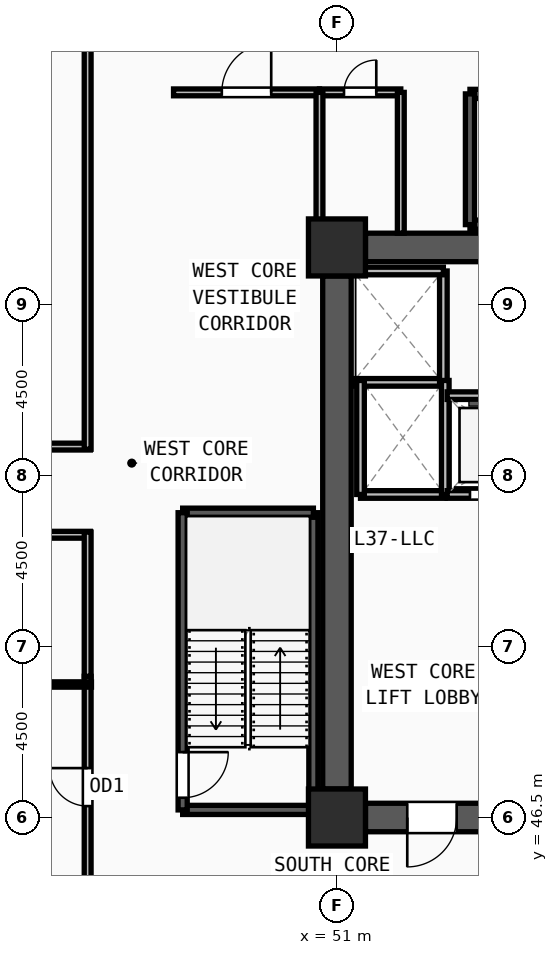
"""IFC4 building model, lengths in metres.
Left out: names, types, materials, properties, quantities, classifications, styles, units other than length and angle.
Written with IfcOpenShell. Run it as: python <this file> out.ifc"""

import sys

from ifc_helpers import new_model, si_unit, direction, frame, frame_2d, origin, origin_2d, place, context, subcontext, project, spatial, rectangle, extrude, source, transform, mapped, element, fill, save


model = new_model("IFC4")
c1 = context("Model", 3, precision=1e-05, world=origin(), true_north=direction((0.0, 1.0)))
c2 = subcontext(c1, "Body", "Model", "MODEL_VIEW")
j1 = project(units=[si_unit("LENGTHUNIT", "METRE"), si_unit("PLANEANGLEUNIT", "RADIAN")], contexts=[c1])
p1 = place(None, origin())
s1 = spatial("IfcSite", under=j1, at=p1, CompositionType="ELEMENT")
p2 = place(p1, origin())
s2 = spatial("IfcBuilding", under=s1, at=p2, CompositionType="ELEMENT")
p3 = place(p2, frame((0.0, 0.0, 144.0)))
s3 = spatial("IfcBuildingStorey", under=s2, at=p3, CompositionType="ELEMENT", Elevation=144.0)
m1 = source(origin(), c2, "Body", "SweptSolid", [
    extrude(rectangle(XDim=1.5, YDim=1.5, at=origin_2d()), origin(), (0.0, 0.0, 1.0), 3.75),
])
for number, where, z_axis, x_axis in (
    (1, (51.0, 46.5, 0.0), (0.0, 0.0, 1.0), (1.0, 0.0, 0.0)),
    (2, (51.0, 61.5, 0.0), (0.0, 0.0, 1.0), (1.0, 0.0, 0.0)),
):
    element("IfcColumn", number, at=place(p3, frame(where, z_axis=z_axis, x_axis=x_axis)), inside=s3, PredefinedType="COLUMN", context=c2, shape_type="MappedRepresentation", body=[
        mapped(m1, transform((0.0, 0.0, 0.0), x_axis=(1.0, 0.0, 0.0), y_axis=(0.0, 1.0, 0.0), z_axis=(0.0, 0.0, 1.0), scale=1.0)),
    ])
p4 = place(p3, frame((51.75, 61.5, 0.0), z_axis=(0.0, 0.0, 1.0), x_axis=(1.0, 0.0, 0.0)))
e3 = element("IfcWall", 3, at=p4, inside=s3, PredefinedType="SHEAR", context=c2, shape_type="SweptSolid", body=[
    extrude(rectangle(XDim=7.5, YDim=0.75, at=frame_2d((3.75, 0.0))), origin(), (0.0, 0.0, 1.0), 3.57),
])
p5 = place(p3, frame((59.25, 46.5, 0.0), z_axis=(0.0, 0.0, 1.0), x_axis=(-1.0, 0.0, 0.0)))
e4 = element("IfcWall", 4, at=p5, inside=s3, PredefinedType="SHEAR", context=c2, shape_type="SweptSolid", body=[
    extrude(rectangle(XDim=7.5, YDim=0.75, at=frame_2d((3.75, 0.0))), origin(), (0.0, 0.0, 1.0), 3.57),
])
m2 = source(origin(), c2, "Body", "SweptSolid", [
    extrude(rectangle(XDim=1.3, YDim=2.2, at=frame_2d((0.65, 1.1))), frame((0.0, 0.385, 0.0), z_axis=(0.0, -1.0, 0.0), x_axis=(1.0, 0.0, 0.0)), (0.0, 0.0, 1.0), 0.77),
])
p6 = place(p5, frame((5.1, 0.0, 0.0)))
e5 = element("IfcOpeningElement", 5, at=p6, cuts=e4, PredefinedType="OPENING", context=c2, shape_type="MappedRepresentation", body=[
    mapped(m2, transform((0.0, 0.0, 0.0), x_axis=(1.0, 0.0, 0.0), y_axis=(0.0, 1.0, 0.0), z_axis=(0.0, 0.0, 1.0), scale=1.0)),
])
m3 = source(origin(), c2, "Body", "SweptSolid", [
    extrude(rectangle(XDim=1.0, YDim=2.2, at=frame_2d((0.5, 1.1))), frame((0.0, 0.385, 0.0), z_axis=(0.0, -1.0, 0.0), x_axis=(1.0, 0.0, 0.0)), (0.0, 0.0, 1.0), 0.77),
])
p7 = place(p5, frame((0.6, 0.0, 0.0)))
e6 = element("IfcOpeningElement", 6, at=p7, cuts=e4, PredefinedType="OPENING", context=c2, shape_type="MappedRepresentation", body=[
    mapped(m3, transform((0.0, 0.0, 0.0), x_axis=(1.0, 0.0, 0.0), y_axis=(0.0, 1.0, 0.0), z_axis=(0.0, 0.0, 1.0), scale=1.0)),
])
p8 = place(p3, frame((51.0, 47.25, 0.0), z_axis=(0.0, 0.0, 1.0), x_axis=(0.0, 1.0, 0.0)))
e7 = element("IfcWall", 7, at=p8, inside=s3, PredefinedType="SHEAR", context=c2, shape_type="SweptSolid", body=[
    extrude(rectangle(XDim=13.5, YDim=0.75, at=frame_2d((6.75, 0.0))), origin(), (0.0, 0.0, 1.0), 3.57),
])
p9 = place(p3, frame((46.94, 46.7, 0.0), z_axis=(0.0, 0.0, 1.0), x_axis=(1.0, 0.0, 0.0)))
e8 = element("IfcWall", 8, at=p9, inside=s3, PredefinedType="SOLIDWALL", context=c2, shape_type="SweptSolid", body=[
    extrude(rectangle(XDim=3.44, YDim=0.24, at=frame_2d((1.72, 0.0))), origin(), (0.0, 0.0, 1.0), 3.57),
])
p10 = place(p3, frame((50.38, 46.7, 0.0), z_axis=(0.0, 0.0, 1.0), x_axis=(0.0, 1.0, 0.0)))
e9 = element("IfcWall", 9, at=p10, inside=s3, PredefinedType="SOLIDWALL", context=c2, shape_type="SweptSolid", body=[
    extrude(rectangle(XDim=7.82, YDim=0.24, at=frame_2d((3.91, 0.0))), origin(), (0.0, 0.0, 1.0), 3.57),
])
p11 = place(p3, frame((50.38, 54.52, 0.0), z_axis=(0.0, 0.0, 1.0), x_axis=(-1.0, 0.0, 0.0)))
e10 = element("IfcWall", 10, at=p11, inside=s3, PredefinedType="SOLIDWALL", context=c2, shape_type="SweptSolid", body=[
    extrude(rectangle(XDim=3.44, YDim=0.24, at=frame_2d((1.72, 0.0))), origin(), (0.0, 0.0, 1.0), 3.57),
])
p12 = place(p3, frame((46.94, 54.52, 0.0), z_axis=(0.0, 0.0, 1.0), x_axis=(0.0, -1.0, 0.0)))
e11 = element("IfcWall", 11, at=p12, inside=s3, PredefinedType="SOLIDWALL", context=c2, shape_type="SweptSolid", body=[
    extrude(rectangle(XDim=7.82, YDim=0.24, at=frame_2d((3.91, 0.0))), origin(), (0.0, 0.0, 1.0), 3.57),
])
m4 = source(origin(), c2, "Body", "SweptSolid", [
    extrude(rectangle(XDim=1.2, YDim=2.2, at=frame_2d((0.6, 1.1))), frame((0.0, 0.13, 0.0), z_axis=(0.0, -1.0, 0.0), x_axis=(1.0, 0.0, 0.0)), (0.0, 0.0, 1.0), 0.26),
])
p13 = place(p12, frame((6.3, 0.0, 0.0)))
e12 = element("IfcOpeningElement", 12, at=p13, cuts=e11, PredefinedType="OPENING", context=c2, shape_type="MappedRepresentation", body=[
    mapped(m4, transform((0.0, 0.0, 0.0), x_axis=(1.0, 0.0, 0.0), y_axis=(0.0, 1.0, 0.0), z_axis=(0.0, 0.0, 1.0), scale=1.0)),
])
p14 = place(p3, frame((54.5, 62.1, 0.0), z_axis=(0.0, 0.0, 1.0), x_axis=(1.0, 0.0, 0.0)))
e13 = element("IfcWall", 13, at=p14, inside=s3, PredefinedType="SOLIDWALL", context=c2, shape_type="SweptSolid", body=[
    extrude(rectangle(XDim=7.82, YDim=0.24, at=frame_2d((3.91, 0.0))), origin(), (0.0, 0.0, 1.0), 3.57),
])
p15 = place(p3, frame((62.32, 65.54, 0.0), z_axis=(0.0, 0.0, 1.0), x_axis=(-1.0, 0.0, 0.0)))
e14 = element("IfcWall", 14, at=p15, inside=s3, PredefinedType="SOLIDWALL", context=c2, shape_type="SweptSolid", body=[
    extrude(rectangle(XDim=7.82, YDim=0.24, at=frame_2d((3.91, 0.0))), origin(), (0.0, 0.0, 1.0), 3.57),
])
p16 = place(p15, frame((6.3, 0.0, 0.0)))
e15 = element("IfcOpeningElement", 15, at=p16, cuts=e14, PredefinedType="OPENING", context=c2, shape_type="MappedRepresentation", body=[
    mapped(m4, transform((0.0, 0.0, 0.0), x_axis=(1.0, 0.0, 0.0), y_axis=(0.0, 1.0, 0.0), z_axis=(0.0, 0.0, 1.0), scale=1.0)),
])
p17 = place(p3, frame((54.5, 65.54, 0.0), z_axis=(0.0, 0.0, 1.0), x_axis=(0.0, -1.0, 0.0)))
e16 = element("IfcWall", 16, at=p17, inside=s3, PredefinedType="SOLIDWALL", context=c2, shape_type="SweptSolid", body=[
    extrude(rectangle(XDim=3.44, YDim=0.24, at=frame_2d((1.72, 0.0))), origin(), (0.0, 0.0, 1.0), 3.57),
])
p18 = place(p3, frame((51.4, 57.95, 0.0), z_axis=(0.0, 0.0, 1.0), x_axis=(1.0, 0.0, 0.0)))
e17 = element("IfcWall", 17, at=p18, inside=s3, PredefinedType="SOLIDWALL", context=c2, shape_type="SweptSolid", body=[
    extrude(rectangle(XDim=2.4, YDim=0.2, at=frame_2d((1.2, 0.0))), origin(), (0.0, 0.0, 1.0), 3.57),
])
p19 = place(p3, frame((53.8, 57.95, 0.0), z_axis=(0.0, 0.0, 1.0), x_axis=(0.0, 1.0, 0.0)))
e18 = element("IfcWall", 18, at=p19, inside=s3, PredefinedType="SOLIDWALL", context=c2, shape_type="SweptSolid", body=[
    extrude(rectangle(XDim=2.93, YDim=0.2, at=frame_2d((1.465, 0.0))), origin(), (0.0, 0.0, 1.0), 3.57),
])
p20 = place(p3, frame((53.8, 60.88, 0.0), z_axis=(0.0, 0.0, 1.0), x_axis=(-1.0, 0.0, 0.0)))
e19 = element("IfcWall", 19, at=p20, inside=s3, PredefinedType="SOLIDWALL", context=c2, shape_type="SweptSolid", body=[
    extrude(rectangle(XDim=2.4, YDim=0.2, at=frame_2d((1.2, 0.0))), origin(), (0.0, 0.0, 1.0), 3.57),
])
p21 = place(p3, frame((51.62, 55.0, 0.0), z_axis=(0.0, 0.0, 1.0), x_axis=(1.0, 0.0, 0.0)))
e20 = element("IfcWall", 20, at=p21, inside=s3, PredefinedType="SOLIDWALL", context=c2, shape_type="SweptSolid", body=[
    extrude(rectangle(XDim=2.23, YDim=0.2, at=frame_2d((1.115, 0.0))), origin(), (0.0, 0.0, 1.0), 3.57),
])
for number, where, z_axis, x_axis in (
    (21, (53.85, 55.0, 0.0), (0.0, 0.0, 1.0), (0.0, 1.0, 0.0)),
    (22, (51.62, 58.0, 0.0), (0.0, 0.0, 1.0), (0.0, -1.0, 0.0)),
):
    element("IfcWall", number, at=place(p3, frame(where, z_axis=z_axis, x_axis=x_axis)), inside=s3, PredefinedType="SOLIDWALL", context=c2, shape_type="SweptSolid", body=[
        extrude(rectangle(XDim=3.0, YDim=0.2, at=frame_2d((1.5, 0.0))), origin(), (0.0, 0.0, 1.0), 3.57),
    ])
p22 = place(p3, frame((53.9, 55.0, 0.0), z_axis=(0.0, 0.0, 1.0), x_axis=(1.0, 0.0, 0.0)))
e23 = element("IfcWall", 23, at=p22, inside=s3, PredefinedType="SOLIDWALL", context=c2, shape_type="SweptSolid", body=[
    extrude(rectangle(XDim=2.3, YDim=0.2, at=frame_2d((1.15, 0.0))), origin(), (0.0, 0.0, 1.0), 3.57),
])
m5 = source(origin(), c2, "Body", "SweptSolid", [
    extrude(rectangle(XDim=1.1, YDim=2.2, at=frame_2d((0.55, 1.1))), frame((0.0, 0.11, 0.0), z_axis=(0.0, -1.0, 0.0), x_axis=(1.0, 0.0, 0.0)), (0.0, 0.0, 1.0), 0.22),
])
p23 = place(p22, frame((0.6, 0.0, 0.0)))
e24 = element("IfcOpeningElement", 24, at=p23, cuts=e23, PredefinedType="OPENING", context=c2, shape_type="MappedRepresentation", body=[
    mapped(m5, transform((0.0, 0.0, 0.0), x_axis=(1.0, 0.0, 0.0), y_axis=(0.0, 1.0, 0.0), z_axis=(0.0, 0.0, 1.0), scale=1.0)),
])
p24 = place(p3, frame((56.2, 57.6, 0.0), z_axis=(0.0, 0.0, 1.0), x_axis=(-1.0, 0.0, 0.0)))
e25 = element("IfcWall", 25, at=p24, inside=s3, PredefinedType="SOLIDWALL", context=c2, shape_type="SweptSolid", body=[
    extrude(rectangle(XDim=2.3, YDim=0.2, at=frame_2d((1.15, 0.0))), origin(), (0.0, 0.0, 1.0), 3.57),
])
p25 = place(p3, frame((50.54, 65.58, 0.0), z_axis=(0.0, 0.0, 1.0), x_axis=(1.0, 0.0, 0.0)))
e26 = element("IfcWall", 26, at=p25, inside=s3, PredefinedType="PARTITIONING", context=c2, shape_type="SweptSolid", body=[
    extrude(rectangle(XDim=2.14, YDim=0.18, at=frame_2d((1.07, 0.0))), origin(), (0.0, 0.0, 1.0), 3.57),
])
m6 = source(origin(), c2, "Body", "SweptSolid", [
    extrude(rectangle(XDim=0.85, YDim=2.1, at=frame_2d((0.425, 1.05))), frame((0.0, 0.1, 0.0), z_axis=(0.0, -1.0, 0.0), x_axis=(1.0, 0.0, 0.0)), (0.0, 0.0, 1.0), 0.2),
])
p26 = place(p25, frame((0.645, 0.0, 0.0)))
e27 = element("IfcOpeningElement", 27, at=p26, cuts=e26, PredefinedType="OPENING", context=c2, shape_type="MappedRepresentation", body=[
    mapped(m6, transform((0.0, 0.0, 0.0), x_axis=(1.0, 0.0, 0.0), y_axis=(0.0, 1.0, 0.0), z_axis=(0.0, 0.0, 1.0), scale=1.0)),
])
p27 = place(p3, frame((46.7, 65.58, 0.0), z_axis=(0.0, 0.0, 1.0), x_axis=(1.0, 0.0, 0.0)))
e28 = element("IfcWall", 28, at=p27, inside=s3, PredefinedType="PARTITIONING", context=c2, shape_type="SweptSolid", body=[
    extrude(rectangle(XDim=3.84, YDim=0.18, at=frame_2d((1.92, 0.0))), origin(), (0.0, 0.0, 1.0), 3.57),
])
m7 = source(origin(), c2, "Body", "SweptSolid", [
    extrude(rectangle(XDim=1.3, YDim=2.2, at=frame_2d((0.65, 1.1))), frame((0.0, 0.1, 0.0), z_axis=(0.0, -1.0, 0.0), x_axis=(1.0, 0.0, 0.0)), (0.0, 0.0, 1.0), 0.2),
])
p28 = place(p27, frame((1.27, 0.0, 0.0)))
e29 = element("IfcOpeningElement", 29, at=p28, cuts=e28, PredefinedType="OPENING", context=c2, shape_type="MappedRepresentation", body=[
    mapped(m7, transform((0.0, 0.0, 0.0), x_axis=(1.0, 0.0, 0.0), y_axis=(0.0, 1.0, 0.0), z_axis=(0.0, 0.0, 1.0), scale=1.0)),
])
p29 = place(p3, frame((29.701, 56.26, 0.0), z_axis=(0.0, 0.0, 1.0), x_axis=(1.0, 0.0, 0.0)))
e30 = element("IfcWall", 30, at=p29, inside=s3, PredefinedType="PARTITIONING", context=c2, shape_type="SweptSolid", body=[
    extrude(rectangle(XDim=14.809, YDim=0.18, at=frame_2d((7.405, 0.0))), origin(), (0.0, 0.0, 1.0), 3.57),
])
m8 = source(origin(), c2, "Body", "SweptSolid", [
    extrude(rectangle(XDim=1.5, YDim=2.2, at=frame_2d((0.75, 1.1))), frame((0.0, 0.1, 0.0), z_axis=(0.0, -1.0, 0.0), x_axis=(1.0, 0.0, 0.0)), (0.0, 0.0, 1.0), 0.2),
])
p30 = place(p29, frame((6.654, 0.0, 0.0)))
e31 = element("IfcOpeningElement", 31, at=p30, cuts=e30, PredefinedType="OPENING", context=c2, shape_type="MappedRepresentation", body=[
    mapped(m8, transform((0.0, 0.0, 0.0), x_axis=(1.0, 0.0, 0.0), y_axis=(0.0, 1.0, 0.0), z_axis=(0.0, 0.0, 1.0), scale=1.0)),
])
p31 = place(p3, frame((44.51, 53.94, 0.0), z_axis=(0.0, 0.0, 1.0), x_axis=(-1.0, 0.0, 0.0)))
e32 = element("IfcWall", 32, at=p31, inside=s3, PredefinedType="PARTITIONING", context=c2, shape_type="SweptSolid", body=[
    extrude(rectangle(XDim=13.647, YDim=0.18, at=frame_2d((6.823, 0.0))), origin(), (0.0, 0.0, 1.0), 3.57),
])
m9 = source(origin(), c2, "Body", "SweptSolid", [
    extrude(rectangle(XDim=1.0, YDim=2.2, at=frame_2d((0.5, 1.1))), frame((0.0, 0.1, 0.0), z_axis=(0.0, -1.0, 0.0), x_axis=(1.0, 0.0, 0.0)), (0.0, 0.0, 1.0), 0.2),
])
p32 = place(p31, frame((6.323, 0.0, 0.0)))
e33 = element("IfcOpeningElement", 33, at=p32, cuts=e32, PredefinedType="OPENING", context=c2, shape_type="MappedRepresentation", body=[
    mapped(m9, transform((0.0, 0.0, 0.0), x_axis=(1.0, 0.0, 0.0), y_axis=(0.0, 1.0, 0.0), z_axis=(0.0, 0.0, 1.0), scale=1.0)),
])
p33 = place(p3, frame((44.44, 44.385, 0.0), z_axis=(0.0, 0.0, 1.0), x_axis=(0.0, 1.0, 0.0)))
e34 = element("IfcWall", 34, at=p33, inside=s3, PredefinedType="PARTITIONING", context=c2, shape_type="SweptSolid", body=[
    extrude(rectangle(XDim=5.83, YDim=0.18, at=frame_2d((2.915, 0.0))), origin(), (0.0, 0.0, 1.0), 3.57),
])
p34 = place(p33, frame((2.415, 0.0, 0.0)))
e35 = element("IfcOpeningElement", 35, at=p34, cuts=e34, PredefinedType="OPENING", context=c2, shape_type="MappedRepresentation", body=[
    mapped(m9, transform((0.0, 0.0, 0.0), x_axis=(1.0, 0.0, 0.0), y_axis=(0.0, 1.0, 0.0), z_axis=(0.0, 0.0, 1.0), scale=1.0)),
])
p35 = place(p3, frame((50.54, 61.95, 0.0), z_axis=(0.0, 0.0, 1.0), x_axis=(0.0, 1.0, 0.0)))
e36 = element("IfcWall", 36, at=p35, inside=s3, PredefinedType="PARTITIONING", context=c2, shape_type="SweptSolid", body=[
    extrude(rectangle(XDim=3.63, YDim=0.18, at=frame_2d((1.815, 0.0))), origin(), (0.0, 0.0, 1.0), 3.57),
])
p36 = place(p3, frame((52.68, 61.875, 0.0), z_axis=(0.0, 0.0, 1.0), x_axis=(0.0, 1.0, 0.0)))
e37 = element("IfcWall", 37, at=p36, inside=s3, PredefinedType="PARTITIONING", context=c2, shape_type="SweptSolid", body=[
    extrude(rectangle(XDim=3.705, YDim=0.18, at=frame_2d((1.853, 0.0))), origin(), (0.0, 0.0, 1.0), 3.57),
])
p37 = place(p3, frame((44.44, 56.19, 0.0), z_axis=(0.0, 0.0, 1.0), x_axis=(0.0, 1.0, 0.0)))
e38 = element("IfcWall", 38, at=p37, inside=s3, PredefinedType="PARTITIONING", context=c2, shape_type="SweptSolid", body=[
    extrude(rectangle(XDim=10.595, YDim=0.18, at=frame_2d((5.297, 0.0))), origin(), (0.0, 0.0, 1.0), 3.57),
])
p38 = place(p3, frame((44.44, 50.215, 0.0), z_axis=(0.0, 0.0, 1.0), x_axis=(0.0, 1.0, 0.0)))
e39 = element("IfcWall", 39, at=p38, inside=s3, PredefinedType="PARTITIONING", context=c2, shape_type="SweptSolid", body=[
    extrude(rectangle(XDim=3.795, YDim=0.18, at=frame_2d((1.897, 0.0))), origin(), (0.0, 0.0, 1.0), 3.57),
])
p39 = place(p3, frame((44.54, 50.0, 0.0), z_axis=(0.0, 0.0, 1.0), x_axis=(-1.0, 0.0, 0.0)))
e40 = element("IfcWall", 40, at=p39, inside=s3, PredefinedType="PARTITIONING", context=c2, shape_type="SweptSolid", body=[
    extrude(rectangle(XDim=11.813, YDim=0.14, at=frame_2d((5.906, 0.0))), origin(), (0.0, 0.0, 1.0), 3.57),
])
m10 = source(origin(), c2, "Body", "SweptSolid", [
    extrude(rectangle(XDim=1.3, YDim=2.2, at=frame_2d((0.65, 1.1))), frame((0.0, 0.025, 0.0), z_axis=(0.0, -1.0, 0.0), x_axis=(1.0, 0.0, 0.0)), (0.0, 0.0, 1.0), 0.05),
])
p40 = place(p6, origin())
e41 = element("IfcDoor", 41, at=p40, inside=s3, OperationType="SINGLE_SWING_RIGHT", PredefinedType="DOOR", context=c2, shape_type="MappedRepresentation", body=[
    mapped(m10, transform((0.0, 0.0, 0.0), x_axis=(1.0, 0.0, 0.0), y_axis=(0.0, 1.0, 0.0), z_axis=(0.0, 0.0, 1.0), scale=1.0)),
])
fill(e5, e41)
m11 = source(origin(), c2, "Body", "SweptSolid", [
    extrude(rectangle(XDim=1.2, YDim=2.2, at=frame_2d((0.6, 1.1))), frame((0.0, 0.025, 0.0), z_axis=(0.0, -1.0, 0.0), x_axis=(1.0, 0.0, 0.0)), (0.0, 0.0, 1.0), 0.05),
])
p41 = place(p13, origin())
e42 = element("IfcDoor", 42, at=p41, inside=s3, OperationType="SINGLE_SWING_LEFT", PredefinedType="DOOR", context=c2, shape_type="MappedRepresentation", body=[
    mapped(m11, transform((0.0, 0.0, 0.0), x_axis=(1.0, 0.0, 0.0), y_axis=(0.0, 1.0, 0.0), z_axis=(0.0, 0.0, 1.0), scale=1.0)),
])
fill(e12, e42)
m12 = source(origin(), c2, "Body", "SweptSolid", [
    extrude(rectangle(XDim=1.1, YDim=2.2, at=frame_2d((0.55, 1.1))), frame((0.0, 0.025, 0.0), z_axis=(0.0, -1.0, 0.0), x_axis=(1.0, 0.0, 0.0)), (0.0, 0.0, 1.0), 0.05),
])
p42 = place(p23, origin())
e43 = element("IfcDoor", 43, at=p42, inside=s3, OperationType="SLIDING_TO_LEFT", PredefinedType="DOOR", context=c2, shape_type="MappedRepresentation", body=[
    mapped(m12, transform((0.0, 0.0, 0.0), x_axis=(1.0, 0.0, 0.0), y_axis=(0.0, 1.0, 0.0), z_axis=(0.0, 0.0, 1.0), scale=1.0)),
])
fill(e24, e43)
m13 = source(origin(), c2, "Body", "SweptSolid", [
    extrude(rectangle(XDim=0.85, YDim=2.1, at=frame_2d((0.425, 1.05))), frame((0.0, 0.025, 0.0), z_axis=(0.0, -1.0, 0.0), x_axis=(1.0, 0.0, 0.0)), (0.0, 0.0, 1.0), 0.05),
])
p43 = place(p26, origin())
e44 = element("IfcDoor", 44, at=p43, inside=s3, OperationType="SINGLE_SWING_RIGHT", PredefinedType="DOOR", context=c2, shape_type="MappedRepresentation", body=[
    mapped(m13, transform((0.0, 0.0, 0.0), x_axis=(1.0, 0.0, 0.0), y_axis=(0.0, 1.0, 0.0), z_axis=(0.0, 0.0, 1.0), scale=1.0)),
])
fill(e27, e44)
p44 = place(p28, origin())
e45 = element("IfcDoor", 45, at=p44, inside=s3, OperationType="SINGLE_SWING_RIGHT", PredefinedType="DOOR", context=c2, shape_type="MappedRepresentation", body=[
    mapped(m10, transform((0.0, 0.0, 0.0), x_axis=(1.0, 0.0, 0.0), y_axis=(0.0, 1.0, 0.0), z_axis=(0.0, 0.0, 1.0), scale=1.0)),
])
fill(e29, e45)
m14 = source(origin(), c2, "Body", "SweptSolid", [
    extrude(rectangle(XDim=1.0, YDim=2.2, at=frame_2d((0.5, 1.1))), frame((0.0, 0.025, 0.0), z_axis=(0.0, -1.0, 0.0), x_axis=(1.0, 0.0, 0.0)), (0.0, 0.0, 1.0), 0.05),
])
p45 = place(p34, origin())
e46 = element("IfcDoor", 46, at=p45, inside=s3, OperationType="SINGLE_SWING_RIGHT", PredefinedType="DOOR", context=c2, shape_type="MappedRepresentation", body=[
    mapped(m14, transform((0.0, 0.0, 0.0), x_axis=(1.0, 0.0, 0.0), y_axis=(0.0, 1.0, 0.0), z_axis=(0.0, 0.0, 1.0), scale=1.0)),
])
fill(e35, e46)
save(model, sys.argv[1])
